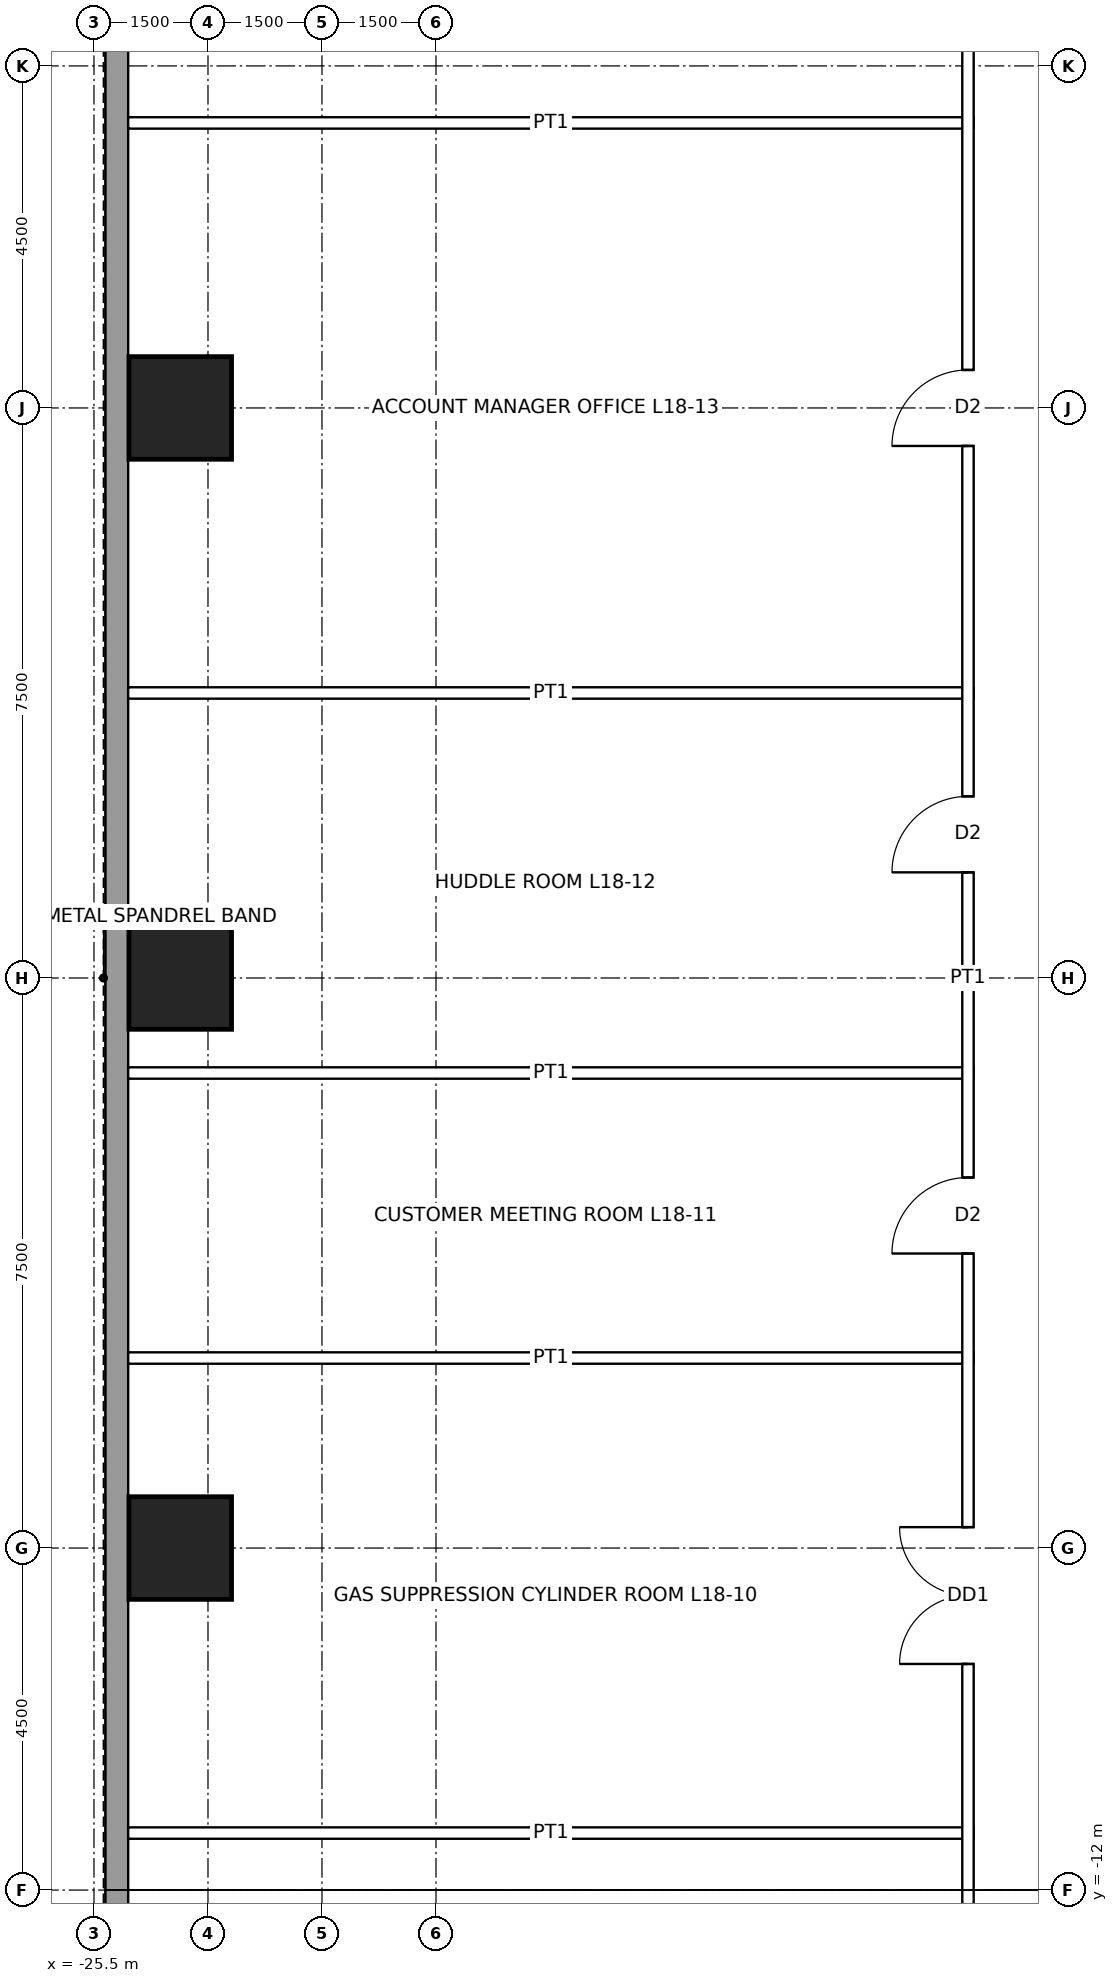
"""IFC4 building model, lengths in metres.
Left out: names, types, materials, properties, quantities, classifications, styles, units other than length and angle.
Written with IfcOpenShell. Run it as: python <this file> out.ifc"""

import sys

from ifc_helpers import new_model, si_unit, direction, frame, frame_2d, origin, origin_2d, place, context, subcontext, project, spatial, rectangle, hollow_rectangle, extrude, element, fill, save


model = new_model("IFC4")
c1 = context("Model", 3, precision=1e-05, world=origin(), true_north=direction((0.0, 1.0)))
c2 = subcontext(c1, "Body", "Model", "MODEL_VIEW")
j1 = project(units=[si_unit("LENGTHUNIT", "METRE"), si_unit("PLANEANGLEUNIT", "RADIAN")], contexts=[c1])
p1 = place(None, origin())
s1 = spatial("IfcSite", under=j1, at=p1, CompositionType="ELEMENT")
p2 = place(p1, origin())
s2 = spatial("IfcBuilding", under=s1, at=p2, CompositionType="ELEMENT")
p3 = place(p2, frame((0.0, 0.0, 93.4)))
s3 = spatial("IfcBuildingStorey", under=s2, at=p3, CompositionType="ELEMENT", Elevation=93.4)
for number, where, z_axis, x_axis in (
    (1, (-24.365, -7.5, 0.0), (0.0, 0.0, 1.0), (1.0, 0.0, 0.0)),
    (2, (-24.365, 0.0, 0.0), (0.0, 0.0, 1.0), (1.0, 0.0, 0.0)),
    (3, (-24.365, 7.5, 0.0), (0.0, 0.0, 1.0), (1.0, 0.0, 0.0)),
):
    element("IfcColumn", number, at=place(p3, frame(where, z_axis=z_axis, x_axis=x_axis)), inside=s3, PredefinedType="COLUMN", context=c2, shape_type="SweptSolid", body=[
        extrude(hollow_rectangle(XDim=1.35, YDim=1.35, WallThickness=0.1, at=origin_2d()), origin(), (0.0, 0.0, 1.0), 5.0),
    ])
p4 = place(p3, frame((-25.2, -17.7, 0.0), z_axis=(0.0, 0.0, 1.0), x_axis=(0.0, 1.0, 0.0)))
e4 = element("IfcWall", 4, at=p4, inside=s3, PredefinedType="SOLIDWALL", context=c2, shape_type="SweptSolid", body=[
    extrude(rectangle(XDim=35.4, YDim=0.3, at=frame_2d((17.7, 0.0))), origin(), (0.0, 0.0, 1.0), 4.75),
])
p5 = place(p3, frame((-25.05, -11.25, 0.0), z_axis=(0.0, 0.0, 1.0), x_axis=(1.0, 0.0, 0.0)))
e5 = element("IfcWall", 5, at=p5, inside=s3, PredefinedType="PARTITIONING", context=c2, shape_type="SweptSolid", body=[
    extrude(rectangle(XDim=11.125, YDim=0.15, at=frame_2d((5.562, 0.0))), origin(), (0.0, 0.0, 1.0), 3.823),
])
for number, where, z_axis, x_axis in (
    (6, (-25.05, -5.0, 0.0), (0.0, 0.0, 1.0), (1.0, 0.0, 0.0)),
    (7, (-25.05, -1.25, 0.0), (0.0, 0.0, 1.0), (1.0, 0.0, 0.0)),
):
    element("IfcWall", number, at=place(p3, frame(where, z_axis=z_axis, x_axis=x_axis)), inside=s3, PredefinedType="PARTITIONING", context=c2, shape_type="SweptSolid", body=[
        extrude(rectangle(XDim=11.125, YDim=0.15, at=frame_2d((5.562, 0.0))), origin(), (0.0, 0.0, 1.0), 4.75),
    ])
for number, where, z_axis, x_axis in (
    (8, (-25.05, 3.75, 0.0), (0.0, 0.0, 1.0), (1.0, 0.0, 0.0)),
    (9, (-25.05, 11.25, 0.0), (0.0, 0.0, 1.0), (1.0, 0.0, 0.0)),
):
    element("IfcWall", number, at=place(p3, frame(where, z_axis=z_axis, x_axis=x_axis)), inside=s3, PredefinedType="PARTITIONING", context=c2, shape_type="SweptSolid", body=[
        extrude(rectangle(XDim=11.125, YDim=0.15, at=frame_2d((5.562, 0.0))), origin(), (0.0, 0.0, 1.0), 3.823),
    ])
p6 = place(p3, frame((-14.0, -14.075, 0.0), z_axis=(0.0, 0.0, 1.0), x_axis=(0.0, 1.0, 0.0)))
e10 = element("IfcWall", 10, at=p6, inside=s3, PredefinedType="PARTITIONING", context=c2, shape_type="SweptSolid", body=[
    extrude(rectangle(XDim=28.15, YDim=0.15, at=frame_2d((14.075, 0.0))), origin(), (0.0, 0.0, 1.0), 4.75),
])
p7 = place(p6, frame((5.05, 0.0, 0.0)))
e11 = element("IfcOpeningElement", 11, at=p7, cuts=e10, PredefinedType="OPENING", context=c2, shape_type="SweptSolid", body=[
    extrude(rectangle(XDim=1.8, YDim=2.4, at=frame_2d((0.9, 1.2))), frame((0.0, 0.085, 0.0), z_axis=(0.0, -1.0, 0.0), x_axis=(1.0, 0.0, 0.0)), (0.0, 0.0, 1.0), 0.17),
])
p8 = place(p6, frame((10.45, 0.0, 0.0)))
e12 = element("IfcOpeningElement", 12, at=p8, cuts=e10, PredefinedType="OPENING", context=c2, shape_type="SweptSolid", body=[
    extrude(rectangle(XDim=1.0, YDim=2.1, at=frame_2d((0.5, 1.05))), frame((0.0, 0.085, 0.0), z_axis=(0.0, -1.0, 0.0), x_axis=(1.0, 0.0, 0.0)), (0.0, 0.0, 1.0), 0.17),
])
p9 = place(p6, frame((15.465, 0.0, 0.0)))
e13 = element("IfcOpeningElement", 13, at=p9, cuts=e10, PredefinedType="OPENING", context=c2, shape_type="SweptSolid", body=[
    extrude(rectangle(XDim=1.0, YDim=2.1, at=frame_2d((0.5, 1.05))), frame((0.0, 0.085, 0.0), z_axis=(0.0, -1.0, 0.0), x_axis=(1.0, 0.0, 0.0)), (0.0, 0.0, 1.0), 0.17),
])
p10 = place(p6, frame((21.075, 0.0, 0.0)))
e14 = element("IfcOpeningElement", 14, at=p10, cuts=e10, PredefinedType="OPENING", context=c2, shape_type="SweptSolid", body=[
    extrude(rectangle(XDim=1.0, YDim=2.1, at=frame_2d((0.5, 1.05))), frame((0.0, 0.085, 0.0), z_axis=(0.0, -1.0, 0.0), x_axis=(1.0, 0.0, 0.0)), (0.0, 0.0, 1.0), 0.17),
])
p11 = place(p7, origin())
e15 = element("IfcDoor", 15, at=p11, inside=s3, OperationType="DOUBLE_DOOR_SINGLE_SWING", PredefinedType="DOOR", context=c2, shape_type="SweptSolid", body=[
    extrude(rectangle(XDim=1.8, YDim=2.4, at=frame_2d((0.9, 1.2))), frame((0.0, 0.025, 0.0), z_axis=(0.0, -1.0, 0.0), x_axis=(1.0, 0.0, 0.0)), (0.0, 0.0, 1.0), 0.05),
])
fill(e11, e15)
p12 = place(p8, origin())
e16 = element("IfcDoor", 16, at=p12, inside=s3, OperationType="SINGLE_SWING_LEFT", PredefinedType="DOOR", context=c2, shape_type="SweptSolid", body=[
    extrude(rectangle(XDim=1.0, YDim=2.1, at=frame_2d((0.5, 1.05))), frame((0.0, 0.025, 0.0), z_axis=(0.0, -1.0, 0.0), x_axis=(1.0, 0.0, 0.0)), (0.0, 0.0, 1.0), 0.05),
])
fill(e12, e16)
p13 = place(p9, origin())
e17 = element("IfcDoor", 17, at=p13, inside=s3, OperationType="SINGLE_SWING_LEFT", PredefinedType="DOOR", context=c2, shape_type="SweptSolid", body=[
    extrude(rectangle(XDim=1.0, YDim=2.1, at=frame_2d((0.5, 1.05))), frame((0.0, 0.025, 0.0), z_axis=(0.0, -1.0, 0.0), x_axis=(1.0, 0.0, 0.0)), (0.0, 0.0, 1.0), 0.05),
])
fill(e13, e17)
p14 = place(p10, origin())
e18 = element("IfcDoor", 18, at=p14, inside=s3, OperationType="SINGLE_SWING_LEFT", PredefinedType="DOOR", context=c2, shape_type="SweptSolid", body=[
    extrude(rectangle(XDim=1.0, YDim=2.1, at=frame_2d((0.5, 1.05))), frame((0.0, 0.025, 0.0), z_axis=(0.0, -1.0, 0.0), x_axis=(1.0, 0.0, 0.0)), (0.0, 0.0, 1.0), 0.05),
])
fill(e14, e18)
save(model, sys.argv[1])
